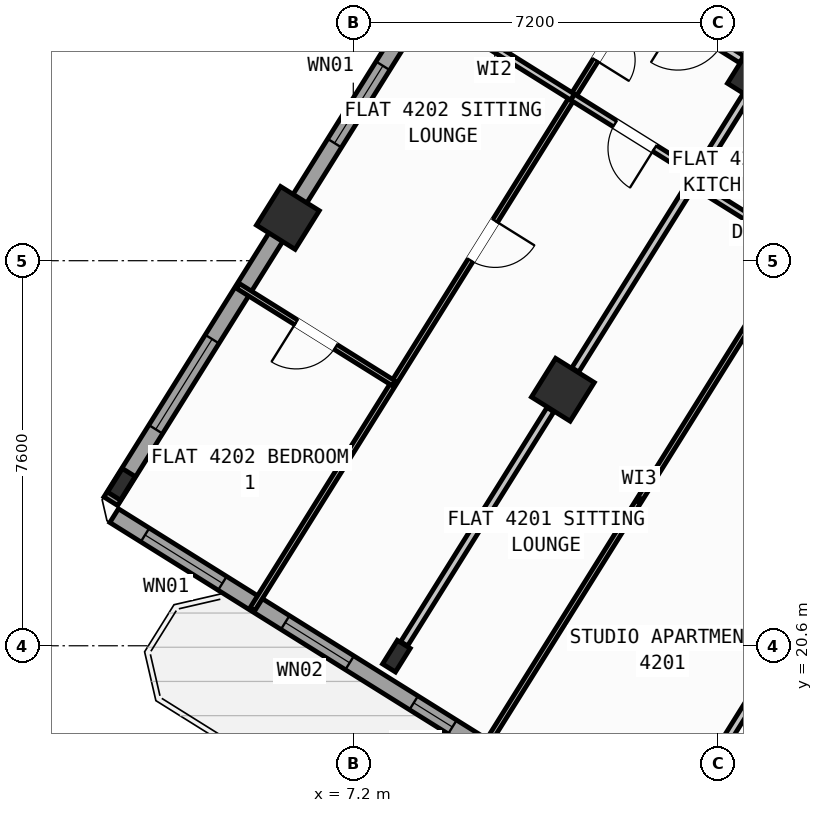
"""IFC4 building model, lengths in metres.
Left out: names, types, materials, properties, quantities, classifications, styles, units other than length and angle.
Written with IfcOpenShell. Run it as: python <this file> out.ifc"""

import sys

from ifc_helpers import new_model, si_unit, direction, frame, frame_2d, origin, origin_2d, place, context, subcontext, project, spatial, rectangle, hollow_rectangle, i_section, extrude, source, transform, mapped, element, fill, save


model = new_model("IFC4")
c1 = context("Model", 3, precision=1e-05, world=origin(), true_north=direction((0.0, 1.0)))
c2 = subcontext(c1, "Body", "Model", "MODEL_VIEW")
j1 = project(units=[si_unit("LENGTHUNIT", "METRE"), si_unit("PLANEANGLEUNIT", "RADIAN")], contexts=[c1])
p1 = place(None, origin())
s1 = spatial("IfcSite", under=j1, at=p1, CompositionType="ELEMENT")
p2 = place(p1, origin())
s2 = spatial("IfcBuilding", under=s1, at=p2, CompositionType="ELEMENT")
p3 = place(p2, frame((0.0, 0.0, 165.9)))
s3 = spatial("IfcBuildingStorey", under=s2, at=p3, CompositionType="ELEMENT", Elevation=165.9)
m1 = source(origin(), c2, "Body", "SweptSolid", [
    extrude(hollow_rectangle(XDim=0.9, YDim=0.9, WallThickness=0.036, at=origin_2d()), origin(), (0.0, 0.0, 1.0), 3.6),
])
for number, where, z_axis, x_axis in (
    (1, (15.205, 31.844, 0.0), (0.0, 0.0, 1.0), (-0.848, 0.53, 0.0)),
    (2, (11.336, 25.653, 0.0), (0.0, 0.0, 1.0), (-0.848, 0.53, 0.0)),
):
    element("IfcColumn", number, at=place(p3, frame(where, z_axis=z_axis, x_axis=x_axis)), inside=s3, PredefinedType="COLUMN", context=c2, shape_type="MappedRepresentation", body=[
        mapped(m1, transform((0.0, 0.0, 0.0), scale=1.0)),
    ])
m2 = source(origin(), c2, "Body", "SweptSolid", [
    extrude(i_section(OverallWidth=0.3, OverallDepth=0.55, WebThickness=0.015, FlangeThickness=0.029, at=origin_2d()), origin(), (0.0, 0.0, 1.0), 3.6),
])
p4 = place(p3, frame((8.051, 20.395, 0.0), z_axis=(0.0, 0.0, 1.0), x_axis=(-0.848048096156, 0.529919264233, 0.0)))
e3 = element("IfcColumn", 3, at=p4, inside=s3, PredefinedType="COLUMN", context=c2, shape_type="MappedRepresentation", body=[
    mapped(m2, transform((0.0, 0.0, 0.0), scale=1.0)),
])
p5 = place(p3, frame((5.909, 29.044, 0.0), z_axis=(0.0, 0.0, 1.0), x_axis=(-0.848048096156, 0.529919264233, 0.0)))
e4 = element("IfcColumn", 4, at=p5, inside=s3, PredefinedType="COLUMN", context=c2, shape_type="MappedRepresentation", body=[
    mapped(m1, transform((0.0, 0.0, 0.0), scale=1.0)),
])
p6 = place(p3, frame((2.623, 23.786, 0.0), z_axis=(0.0, 0.0, 1.0), x_axis=(-0.848048096156, 0.529919264233, 0.0)))
e5 = element("IfcColumn", 5, at=p6, inside=s3, PredefinedType="COLUMN", context=c2, shape_type="MappedRepresentation", body=[
    mapped(m2, transform((0.0, 0.0, 0.0), scale=1.0)),
])
p7 = place(p3, frame((29.268, 6.429, 0.0), z_axis=(0.0, 0.0, 1.0), x_axis=(-0.848049971435, 0.529916263149, 0.0)))
e6 = element("IfcWall", 6, at=p7, inside=s3, PredefinedType="STANDARD", context=c2, shape_type="SweptSolid", body=[
    extrude(rectangle(XDim=31.588, YDim=0.32, at=frame_2d((15.794, 0.0))), origin(), (0.0, 0.0, 1.0), 3.32),
])
p8 = place(p7, frame((16.362, 0.0, 0.0)))
e7 = element("IfcOpeningElement", 7, at=p8, cuts=e6, PredefinedType="OPENING", context=c2, shape_type="SweptSolid", body=[
    extrude(rectangle(XDim=1.2, YDim=2.15, at=frame_2d((0.6, 1.075))), frame((0.0, 0.17, 0.0), z_axis=(0.0, -1.0, 0.0), x_axis=(1.0, 0.0, 0.0)), (0.0, 0.0, 1.0), 0.34),
])
p9 = place(p7, frame((2.989, 0.0, 0.8)))
e8 = element("IfcOpeningElement", 8, at=p9, cuts=e6, PredefinedType="OPENING", context=c2, shape_type="SweptSolid", body=[
    extrude(rectangle(XDim=2.1, YDim=1.55, at=frame_2d((1.05, 0.775))), frame((0.0, 0.17, 0.0), z_axis=(0.0, -1.0, 0.0), x_axis=(1.0, 0.0, 0.0)), (0.0, 0.0, 1.0), 0.34),
])
p10 = place(p7, frame((8.359, 0.0, 0.8)))
e9 = element("IfcOpeningElement", 9, at=p10, cuts=e6, PredefinedType="OPENING", context=c2, shape_type="SweptSolid", body=[
    extrude(rectangle(XDim=2.1, YDim=1.55, at=frame_2d((1.05, 0.775))), frame((0.0, 0.17, 0.0), z_axis=(0.0, -1.0, 0.0), x_axis=(1.0, 0.0, 0.0)), (0.0, 0.0, 1.0), 0.34),
])
p11 = place(p7, frame((13.284, 0.0, 0.95)))
e10 = element("IfcOpeningElement", 10, at=p11, cuts=e6, PredefinedType="OPENING", context=c2, shape_type="SweptSolid", body=[
    extrude(rectangle(XDim=1.2, YDim=1.4, at=frame_2d((0.6, 0.7))), frame((0.0, 0.17, 0.0), z_axis=(0.0, -1.0, 0.0), x_axis=(1.0, 0.0, 0.0)), (0.0, 0.0, 1.0), 0.34),
])
p12 = place(p7, frame((20.39, 0.0, 0.95)))
e11 = element("IfcOpeningElement", 11, at=p12, cuts=e6, PredefinedType="OPENING", context=c2, shape_type="SweptSolid", body=[
    extrude(rectangle(XDim=1.2, YDim=1.4, at=frame_2d((0.6, 0.7))), frame((0.0, 0.17, 0.0), z_axis=(0.0, -1.0, 0.0), x_axis=(1.0, 0.0, 0.0)), (0.0, 0.0, 1.0), 0.34),
])
p13 = place(p7, frame((23.715, 0.0, 1.0)))
e12 = element("IfcOpeningElement", 12, at=p13, cuts=e6, PredefinedType="OPENING", context=c2, shape_type="SweptSolid", body=[
    extrude(rectangle(XDim=0.9, YDim=1.25, at=frame_2d((0.45, 0.625))), frame((0.0, 0.17, 0.0), z_axis=(0.0, -1.0, 0.0), x_axis=(1.0, 0.0, 0.0)), (0.0, 0.0, 1.0), 0.34),
])
p14 = place(p7, frame((26.106, 0.0, 0.85)))
e13 = element("IfcOpeningElement", 13, at=p14, cuts=e6, PredefinedType="OPENING", context=c2, shape_type="SweptSolid", body=[
    extrude(rectangle(XDim=1.5, YDim=1.5, at=frame_2d((0.75, 0.75))), frame((0.0, 0.17, 0.0), z_axis=(0.0, -1.0, 0.0), x_axis=(1.0, 0.0, 0.0)), (0.0, 0.0, 1.0), 0.34),
])
p15 = place(p7, frame((29.068, 0.0, 0.85)))
e14 = element("IfcOpeningElement", 14, at=p15, cuts=e6, PredefinedType="OPENING", context=c2, shape_type="SweptSolid", body=[
    extrude(rectangle(XDim=1.8, YDim=1.5, at=frame_2d((0.9, 0.75))), frame((0.0, 0.17, 0.0), z_axis=(0.0, -1.0, 0.0), x_axis=(1.0, 0.0, 0.0)), (0.0, 0.0, 1.0), 0.34),
])
p16 = place(p3, frame((2.415, 23.452, 0.0), z_axis=(0.0, 0.0, 1.0), x_axis=(0.52991049553, 0.848053575387, 0.0)))
e15 = element("IfcWall", 15, at=p16, inside=s3, PredefinedType="STANDARD", context=c2, shape_type="SweptSolid", body=[
    extrude(rectangle(XDim=21.587, YDim=0.32, at=frame_2d((10.794, 0.0))), origin(), (0.0, 0.0, 1.0), 2.795),
])
p17 = place(p16, frame((1.673, 0.0, 0.8)))
e16 = element("IfcOpeningElement", 16, at=p17, cuts=e15, PredefinedType="OPENING", context=c2, shape_type="SweptSolid", body=[
    extrude(rectangle(XDim=2.1, YDim=1.55, at=frame_2d((1.05, 0.775))), frame((0.0, 0.17, 0.0), z_axis=(0.0, -1.0, 0.0), x_axis=(1.0, 0.0, 0.0)), (0.0, 0.0, 1.0), 0.34),
])
p18 = place(p16, frame((8.334, 0.0, 0.85)))
e17 = element("IfcOpeningElement", 17, at=p18, cuts=e15, PredefinedType="OPENING", context=c2, shape_type="SweptSolid", body=[
    extrude(rectangle(XDim=1.8, YDim=1.5, at=frame_2d((0.9, 0.75))), frame((0.0, 0.17, 0.0), z_axis=(0.0, -1.0, 0.0), x_axis=(1.0, 0.0, 0.0)), (0.0, 0.0, 1.0), 0.34),
])
p19 = place(p16, frame((17.172, 0.0, 0.85)))
e18 = element("IfcOpeningElement", 18, at=p19, cuts=e15, PredefinedType="OPENING", context=c2, shape_type="SweptSolid", body=[
    extrude(rectangle(XDim=1.5, YDim=1.5, at=frame_2d((0.75, 0.75))), frame((0.0, 0.17, 0.0), z_axis=(0.0, -1.0, 0.0), x_axis=(1.0, 0.0, 0.0)), (0.0, 0.0, 1.0), 0.34),
])
p20 = place(p3, frame((14.138, 41.825, 0.0), z_axis=(0.0, 0.0, 1.0), x_axis=(0.848046498049, -0.529921821731, 0.0)))
e19 = element("IfcWall", 19, at=p20, inside=s3, PredefinedType="STANDARD", context=c2, shape_type="SweptSolid", body=[
    extrude(rectangle(XDim=31.588, YDim=0.32, at=frame_2d((15.794, 0.0))), origin(), (0.0, 0.0, 1.0), 3.32),
])
p21 = place(p20, frame((3.253, 0.0, 0.0)))
e20 = element("IfcOpeningElement", 20, at=p21, cuts=e19, PredefinedType="OPENING", context=c2, shape_type="SweptSolid", body=[
    extrude(rectangle(XDim=1.05, YDim=2.15, at=frame_2d((0.525, 1.075))), frame((0.0, 0.17, 0.0), z_axis=(0.0, -1.0, 0.0), x_axis=(1.0, 0.0, 0.0)), (0.0, 0.0, 1.0), 0.34),
])
p22 = place(p20, frame((0.863, 0.0, 0.85)))
e21 = element("IfcOpeningElement", 21, at=p22, cuts=e19, PredefinedType="OPENING", context=c2, shape_type="SweptSolid", body=[
    extrude(rectangle(XDim=1.8, YDim=1.5, at=frame_2d((0.9, 0.75))), frame((0.0, 0.17, 0.0), z_axis=(0.0, -1.0, 0.0), x_axis=(1.0, 0.0, 0.0)), (0.0, 0.0, 1.0), 0.34),
])
p23 = place(p20, frame((8.494, 0.0, 0.85)))
e22 = element("IfcOpeningElement", 22, at=p23, cuts=e19, PredefinedType="OPENING", context=c2, shape_type="SweptSolid", body=[
    extrude(rectangle(XDim=1.8, YDim=1.5, at=frame_2d((0.9, 0.75))), frame((0.0, 0.17, 0.0), z_axis=(0.0, -1.0, 0.0), x_axis=(1.0, 0.0, 0.0)), (0.0, 0.0, 1.0), 0.34),
])
p24 = place(p20, frame((13.874, 0.0, 0.85)))
e23 = element("IfcOpeningElement", 23, at=p24, cuts=e19, PredefinedType="OPENING", context=c2, shape_type="SweptSolid", body=[
    extrude(rectangle(XDim=1.5, YDim=1.5, at=frame_2d((0.75, 0.75))), frame((0.0, 0.17, 0.0), z_axis=(0.0, -1.0, 0.0), x_axis=(1.0, 0.0, 0.0)), (0.0, 0.0, 1.0), 0.34),
])
p25 = place(p20, frame((17.104, 0.0, 1.0)))
e24 = element("IfcOpeningElement", 24, at=p25, cuts=e19, PredefinedType="OPENING", context=c2, shape_type="SweptSolid", body=[
    extrude(rectangle(XDim=0.9, YDim=1.25, at=frame_2d((0.45, 0.625))), frame((0.0, 0.17, 0.0), z_axis=(0.0, -1.0, 0.0), x_axis=(1.0, 0.0, 0.0)), (0.0, 0.0, 1.0), 0.34),
])
p26 = place(p20, frame((22.144, 0.0, 1.0)))
e25 = element("IfcOpeningElement", 25, at=p26, cuts=e19, PredefinedType="OPENING", context=c2, shape_type="SweptSolid", body=[
    extrude(rectangle(XDim=0.9, YDim=1.25, at=frame_2d((0.45, 0.625))), frame((0.0, 0.17, 0.0), z_axis=(0.0, -1.0, 0.0), x_axis=(1.0, 0.0, 0.0)), (0.0, 0.0, 1.0), 0.34),
])
p27 = place(p20, frame((27.744, 0.0, 1.0)))
e26 = element("IfcOpeningElement", 26, at=p27, cuts=e19, PredefinedType="OPENING", context=c2, shape_type="SweptSolid", body=[
    extrude(rectangle(XDim=0.9, YDim=1.25, at=frame_2d((0.45, 0.625))), frame((0.0, 0.17, 0.0), z_axis=(0.0, -1.0, 0.0), x_axis=(1.0, 0.0, 0.0)), (0.0, 0.0, 1.0), 0.34),
])
p28 = place(p3, frame((25.065, 28.394, 0.0), z_axis=(0.0, 0.0, 1.0), x_axis=(-0.848048310262, 0.529918921593, 0.0)))
e27 = element("IfcWall", 27, at=p28, inside=s3, PredefinedType="PARTITIONING", context=c2, shape_type="SweptSolid", body=[
    extrude(rectangle(XDim=16.73, YDim=0.16, at=frame_2d((8.365, 0.0))), origin(), (0.0, 0.0, 1.0), 3.31),
])
p29 = place(p28, frame((2.22, 0.0, 0.0)))
e28 = element("IfcOpeningElement", 28, at=p29, cuts=e27, PredefinedType="OPENING", context=c2, shape_type="SweptSolid", body=[
    extrude(rectangle(XDim=0.86, YDim=2.05, at=frame_2d((0.43, 1.025))), frame((0.0, 0.09, 0.0), z_axis=(0.0, -1.0, 0.0), x_axis=(1.0, 0.0, 0.0)), (0.0, 0.0, 1.0), 0.18),
])
p30 = place(p28, frame((7.82, 0.0, 0.0)))
e29 = element("IfcOpeningElement", 29, at=p30, cuts=e27, PredefinedType="OPENING", context=c2, shape_type="SweptSolid", body=[
    extrude(rectangle(XDim=1.0, YDim=2.1, at=frame_2d((0.5, 1.05))), frame((0.0, 0.09, 0.0), z_axis=(0.0, -1.0, 0.0), x_axis=(1.0, 0.0, 0.0)), (0.0, 0.0, 1.0), 0.18),
])
p31 = place(p28, frame((12.95, 0.0, 0.0)))
e30 = element("IfcOpeningElement", 30, at=p31, cuts=e27, PredefinedType="OPENING", context=c2, shape_type="SweptSolid", body=[
    extrude(rectangle(XDim=1.0, YDim=2.1, at=frame_2d((0.5, 1.05))), frame((0.0, 0.09, 0.0), z_axis=(0.0, -1.0, 0.0), x_axis=(1.0, 0.0, 0.0)), (0.0, 0.0, 1.0), 0.18),
])
p32 = place(p3, frame((14.866, 32.173, 0.0), z_axis=(0.0, 0.0, 1.0), x_axis=(-0.848053401719, 0.529910773464, 0.0)))
e31 = element("IfcWall", 31, at=p32, inside=s3, PredefinedType="PARTITIONING", context=c2, shape_type="SweptSolid", body=[
    extrude(rectangle(XDim=5.476, YDim=0.16, at=frame_2d((2.738, 0.0))), origin(), (0.0, 0.0, 1.0), 2.795),
])
p33 = place(p32, frame((0.488, 0.0, 0.0)))
e32 = element("IfcOpeningElement", 32, at=p33, cuts=e31, PredefinedType="OPENING", context=c2, shape_type="SweptSolid", body=[
    extrude(rectangle(XDim=1.0, YDim=2.1, at=frame_2d((0.5, 1.05))), frame((0.0, 0.09, 0.0), z_axis=(0.0, -1.0, 0.0), x_axis=(1.0, 0.0, 0.0)), (0.0, 0.0, 1.0), 0.18),
])
p34 = place(p3, frame((16.519, 21.87, 0.0), z_axis=(0.0, 0.0, 1.0), x_axis=(-0.529922447305, -0.848046107144, 0.0)))
e33 = element("IfcWall", 33, at=p34, inside=s3, PredefinedType="PARTITIONING", context=c2, shape_type="SweptSolid", body=[
    extrude(rectangle(XDim=5.451, YDim=0.16, at=frame_2d((2.726, 0.0))), origin(), (0.0, 0.0, 1.0), 2.795),
])
p35 = place(p3, frame((14.96, 31.452, 0.0), z_axis=(0.0, 0.0, 1.0), x_axis=(-0.529947310719, -0.848030570122, 0.0)))
e34 = element("IfcWall", 34, at=p35, inside=s3, PredefinedType="PARTITIONING", context=c2, shape_type="SweptSolid", body=[
    extrude(rectangle(XDim=6.376, YDim=0.16, at=frame_2d((3.188, 0.0))), origin(), (0.0, 0.0, 1.0), 2.795),
])
p36 = place(p3, frame((11.091, 25.261, 0.0), z_axis=(0.0, 0.0, 1.0), x_axis=(-0.52994257524, -0.848033529377, 0.0)))
e35 = element("IfcWall", 35, at=p36, inside=s3, PredefinedType="PARTITIONING", context=c2, shape_type="SweptSolid", body=[
    extrude(rectangle(XDim=5.451, YDim=0.16, at=frame_2d((2.726, 0.0))), origin(), (0.0, 0.0, 1.0), 2.795),
])
p37 = place(p3, frame((19.318, 26.349, 0.0), z_axis=(0.0, 0.0, 1.0), x_axis=(-0.848039019877, 0.529933789039, 0.0)))
e36 = element("IfcWall", 36, at=p37, inside=s3, PredefinedType="PLUMBINGWALL", context=c2, shape_type="SweptSolid", body=[
    extrude(rectangle(XDim=6.4, YDim=0.14, at=frame_2d((3.2, 0.0))), origin(), (0.0, 0.0, 1.0), 3.31),
])
p38 = place(p37, frame((2.824, 0.0, 0.0)))
e37 = element("IfcOpeningElement", 37, at=p38, cuts=e36, PredefinedType="OPENING", context=c2, shape_type="SweptSolid", body=[
    extrude(rectangle(XDim=0.78, YDim=2.05, at=frame_2d((0.39, 1.025))), frame((0.0, 0.08, 0.0), z_axis=(0.0, -1.0, 0.0), x_axis=(1.0, 0.0, 0.0)), (0.0, 0.0, 1.0), 0.16),
])
p39 = place(p3, frame((15.953, 28.452, 0.0), z_axis=(0.0, 0.0, 1.0), x_axis=(-0.529931645041, -0.848040359643, 0.0)))
e38 = element("IfcWall", 38, at=p39, inside=s3, PredefinedType="PARTITIONING", context=c2, shape_type="SweptSolid", body=[
    extrude(rectangle(XDim=11.74, YDim=0.11, at=frame_2d((5.87, 0.0))), origin(), (0.0, 0.0, 1.0), 3.31),
])
p40 = place(p39, frame((0.35, 0.0, 0.0)))
e39 = element("IfcOpeningElement", 39, at=p40, cuts=e38, PredefinedType="OPENING", context=c2, shape_type="SweptSolid", body=[
    extrude(rectangle(XDim=0.92, YDim=2.08, at=frame_2d((0.46, 1.04))), frame((0.0, 0.065, 0.0), z_axis=(0.0, -1.0, 0.0), x_axis=(1.0, 0.0, 0.0)), (0.0, 0.0, 1.0), 0.13),
])
p41 = place(p3, frame((12.798, 33.465, 0.0), z_axis=(0.0, 0.0, 1.0), x_axis=(-0.529916182913, -0.848050021571, 0.0)))
e40 = element("IfcWall", 40, at=p41, inside=s3, PredefinedType="PARTITIONING", context=c2, shape_type="SweptSolid", body=[
    extrude(rectangle(XDim=14.32, YDim=0.11, at=frame_2d((7.16, 0.0))), origin(), (0.0, 0.0, 1.0), 3.31),
])
p42 = place(p41, frame((0.76, 0.0, 0.0)))
e41 = element("IfcOpeningElement", 41, at=p42, cuts=e40, PredefinedType="OPENING", context=c2, shape_type="SweptSolid", body=[
    extrude(rectangle(XDim=0.78, YDim=2.05, at=frame_2d((0.39, 1.025))), frame((0.0, 0.065, 0.0), z_axis=(0.0, -1.0, 0.0), x_axis=(1.0, 0.0, 0.0)), (0.0, 0.0, 1.0), 0.13),
])
p43 = place(p41, frame((5.281, 0.0, 0.0)))
e42 = element("IfcOpeningElement", 42, at=p43, cuts=e40, PredefinedType="OPENING", context=c2, shape_type="SweptSolid", body=[
    extrude(rectangle(XDim=0.92, YDim=2.08, at=frame_2d((0.46, 1.04))), frame((0.0, 0.065, 0.0), z_axis=(0.0, -1.0, 0.0), x_axis=(1.0, 0.0, 0.0)), (0.0, 0.0, 1.0), 0.13),
])
p44 = place(p3, frame((13.986, 29.893, 0.0), z_axis=(0.0, 0.0, 1.0), x_axis=(-0.84802195137, 0.529961102341, 0.0)))
e43 = element("IfcWall", 43, at=p44, inside=s3, PredefinedType="PLUMBINGWALL", context=c2, shape_type="SweptSolid", body=[
    extrude(rectangle(XDim=2.9, YDim=0.14, at=frame_2d((1.45, 0.0))), origin(), (0.0, 0.0, 1.0), 3.31),
])
p45 = place(p44, frame((0.99, 0.0, 0.0)))
e44 = element("IfcOpeningElement", 44, at=p45, cuts=e43, PredefinedType="OPENING", context=c2, shape_type="SweptSolid", body=[
    extrude(rectangle(XDim=0.92, YDim=2.08, at=frame_2d((0.46, 1.04))), frame((0.0, 0.08, 0.0), z_axis=(0.0, -1.0, 0.0), x_axis=(1.0, 0.0, 0.0)), (0.0, 0.0, 1.0), 0.16),
])
p46 = place(p3, frame((11.526, 31.43, 0.0), z_axis=(0.0, 0.0, 1.0), x_axis=(-0.848051346257, 0.52991406295, 0.0)))
e45 = element("IfcWall", 45, at=p46, inside=s3, PredefinedType="PLUMBINGWALL", context=c2, shape_type="SweptSolid", body=[
    extrude(rectangle(XDim=3.62, YDim=0.14, at=frame_2d((1.81, 0.0))), origin(), (0.0, 0.0, 1.0), 3.31),
])
p47 = place(p3, frame((7.997, 25.781, 0.0), z_axis=(0.0, 0.0, 1.0), x_axis=(-0.848051346257, 0.52991406295, 0.0)))
e46 = element("IfcWall", 46, at=p47, inside=s3, PredefinedType="PARTITIONING", context=c2, shape_type="SweptSolid", body=[
    extrude(rectangle(XDim=3.62, YDim=0.11, at=frame_2d((1.81, 0.0))), origin(), (0.0, 0.0, 1.0), 3.31),
])
p48 = place(p47, frame((1.35, 0.0, 0.0)))
e47 = element("IfcOpeningElement", 47, at=p48, cuts=e46, PredefinedType="OPENING", context=c2, shape_type="SweptSolid", body=[
    extrude(rectangle(XDim=0.92, YDim=2.08, at=frame_2d((0.46, 1.04))), frame((0.0, 0.065, 0.0), z_axis=(0.0, -1.0, 0.0), x_axis=(1.0, 0.0, 0.0)), (0.0, 0.0, 1.0), 0.13),
])
m3 = source(origin(), c2, "Body", "SweptSolid", [
    extrude(rectangle(XDim=0.9, YDim=1.25, at=frame_2d((0.45, 0.625))), frame((0.0, 0.03, 0.0), z_axis=(0.0, -1.0, 0.0), x_axis=(1.0, 0.0, 0.0)), (0.0, 0.0, 1.0), 0.06),
])
p49 = place(p13, origin())
e48 = element("IfcWindow", 48, at=p49, inside=s3, PartitioningType="SINGLE_PANEL", PredefinedType="WINDOW", context=c2, shape_type="MappedRepresentation", body=[
    mapped(m3, transform((0.0, 0.0, 0.0), scale=1.0)),
])
fill(e12, e48)
m4 = source(origin(), c2, "Body", "SweptSolid", [
    extrude(rectangle(XDim=1.5, YDim=1.5, at=frame_2d((0.75, 0.75))), frame((0.0, 0.03, 0.0), z_axis=(0.0, -1.0, 0.0), x_axis=(1.0, 0.0, 0.0)), (0.0, 0.0, 1.0), 0.06),
])
p50 = place(p14, origin())
e49 = element("IfcWindow", 49, at=p50, inside=s3, PartitioningType="SINGLE_PANEL", PredefinedType="WINDOW", context=c2, shape_type="MappedRepresentation", body=[
    mapped(m4, transform((0.0, 0.0, 0.0), scale=1.0)),
])
fill(e13, e49)
m5 = source(origin(), c2, "Body", "SweptSolid", [
    extrude(rectangle(XDim=1.8, YDim=1.5, at=frame_2d((0.9, 0.75))), frame((0.0, 0.03, 0.0), z_axis=(0.0, -1.0, 0.0), x_axis=(1.0, 0.0, 0.0)), (0.0, 0.0, 1.0), 0.06),
])
p51 = place(p15, origin())
e50 = element("IfcWindow", 50, at=p51, inside=s3, PartitioningType="SINGLE_PANEL", PredefinedType="WINDOW", context=c2, shape_type="MappedRepresentation", body=[
    mapped(m5, transform((0.0, 0.0, 0.0), scale=1.0)),
])
fill(e14, e50)
m6 = source(origin(), c2, "Body", "SweptSolid", [
    extrude(rectangle(XDim=2.1, YDim=1.55, at=frame_2d((1.05, 0.775))), frame((0.0, 0.03, 0.0), z_axis=(0.0, -1.0, 0.0), x_axis=(1.0, 0.0, 0.0)), (0.0, 0.0, 1.0), 0.06),
])
p52 = place(p17, origin())
e51 = element("IfcWindow", 51, at=p52, inside=s3, PartitioningType="SINGLE_PANEL", PredefinedType="WINDOW", context=c2, shape_type="MappedRepresentation", body=[
    mapped(m6, transform((0.0, 0.0, 0.0), scale=1.0)),
])
fill(e16, e51)
p53 = place(p18, origin())
e52 = element("IfcWindow", 52, at=p53, inside=s3, PartitioningType="SINGLE_PANEL", PredefinedType="WINDOW", context=c2, shape_type="MappedRepresentation", body=[
    mapped(m5, transform((0.0, 0.0, 0.0), scale=1.0)),
])
fill(e17, e52)
m7 = source(origin(), c2, "Body", "SweptSolid", [
    extrude(rectangle(XDim=0.92, YDim=2.08, at=frame_2d((0.46, 1.04))), frame((0.0, 0.025, 0.0), z_axis=(0.0, -1.0, 0.0), x_axis=(1.0, 0.0, 0.0)), (0.0, 0.0, 1.0), 0.05),
])
p54 = place(p45, origin())
e53 = element("IfcDoor", 53, at=p54, inside=s3, OperationType="SINGLE_SWING_LEFT", PredefinedType="DOOR", context=c2, shape_type="MappedRepresentation", body=[
    mapped(m7, transform((0.0, 0.0, 0.0), scale=1.0)),
])
fill(e44, e53)
m8 = source(origin(), c2, "Body", "SweptSolid", [
    extrude(rectangle(XDim=0.78, YDim=2.05, at=frame_2d((0.39, 1.025))), frame((0.0, 0.025, 0.0), z_axis=(0.0, -1.0, 0.0), x_axis=(1.0, 0.0, 0.0)), (0.0, 0.0, 1.0), 0.05),
])
p55 = place(p42, origin())
e54 = element("IfcDoor", 54, at=p55, inside=s3, OperationType="SINGLE_SWING_RIGHT", PredefinedType="DOOR", context=c2, shape_type="MappedRepresentation", body=[
    mapped(m8, transform((0.0, 0.0, 0.0), scale=1.0)),
])
fill(e41, e54)
p56 = place(p43, origin())
e55 = element("IfcDoor", 55, at=p56, inside=s3, OperationType="SINGLE_SWING_LEFT", PredefinedType="DOOR", context=c2, shape_type="MappedRepresentation", body=[
    mapped(m7, transform((0.0, 0.0, 0.0), scale=1.0)),
])
fill(e42, e55)
p57 = place(p48, origin())
e56 = element("IfcDoor", 56, at=p57, inside=s3, OperationType="SINGLE_SWING_RIGHT", PredefinedType="DOOR", context=c2, shape_type="MappedRepresentation", body=[
    mapped(m7, transform((0.0, 0.0, 0.0), scale=1.0)),
])
fill(e47, e56)
save(model, sys.argv[1])
